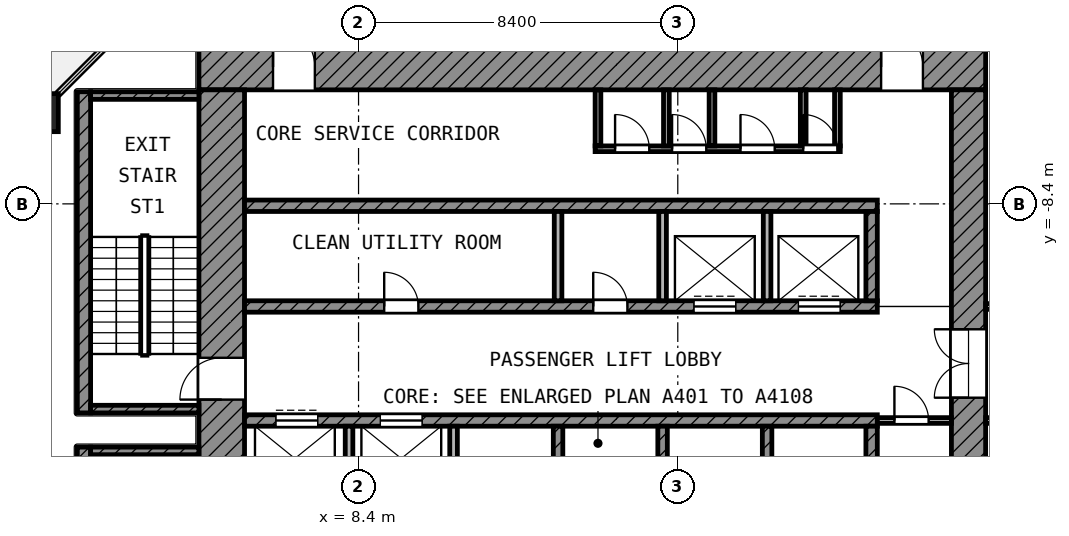
"""IFC4 building model, lengths in metres.
Left out: names, types, materials, properties, quantities, classifications, styles, units other than length and angle.
Written with IfcOpenShell. Run it as: python <this file> out.ifc"""

import sys

from ifc_helpers import new_model, si_unit, direction, frame, frame_2d, origin, origin_2d, place, context, subcontext, project, spatial, rectangle, extrude, element, fill, save


model = new_model("IFC4")
c1 = context("Model", 3, precision=1e-05, world=origin(), true_north=direction((0.0, 1.0)))
c2 = subcontext(c1, "Body", "Model", "MODEL_VIEW")
j1 = project(units=[si_unit("LENGTHUNIT", "METRE"), si_unit("PLANEANGLEUNIT", "RADIAN")], contexts=[c1])
p1 = place(None, origin())
s1 = spatial("IfcSite", under=j1, at=p1, CompositionType="ELEMENT")
p2 = place(p1, origin())
s2 = spatial("IfcBuilding", under=s1, at=p2, CompositionType="ELEMENT")
p3 = place(p2, frame((0.0, 0.0, 171.0)))
s3 = spatial("IfcBuildingStorey", under=s2, at=p3, CompositionType="ELEMENT", Elevation=171.0)
p4 = place(p3, frame((0.0, -6.0, 0.0), z_axis=(0.0, 0.0, 1.0), x_axis=(1.0, 0.0, 0.0)))
e1 = element("IfcColumn", 1, at=p4, inside=s3, PredefinedType="COLUMN", context=c2, shape_type="SweptSolid", body=[
    extrude(rectangle(XDim=1.0, YDim=1.0, at=origin_2d()), origin(), (0.0, 0.0, 1.0), 4.2),
])
p5 = place(p3, frame((4.2, -4.8, 0.0), z_axis=(0.0, 0.0, 1.0), x_axis=(1.0, 0.0, 0.0)))
e2 = element("IfcWall", 2, at=p5, inside=s3, PredefinedType="SHEAR", context=c2, shape_type="SweptSolid", body=[
    extrude(rectangle(XDim=20.7, YDim=1.2, at=frame_2d((10.35, 0.0))), origin(), (0.0, 0.0, 1.0), 3.6),
])
p6 = place(p5, frame((1.95, 0.0, 0.0)))
e3 = element("IfcOpeningElement", 3, at=p6, cuts=e2, PredefinedType="OPENING", context=c2, shape_type="SweptSolid", body=[
    extrude(rectangle(XDim=1.1, YDim=2.1, at=frame_2d((0.55, 1.05))), frame((0.0, 0.61, 0.0), z_axis=(0.0, -1.0, 0.0), x_axis=(1.0, 0.0, 0.0)), (0.0, 0.0, 1.0), 1.22),
])
p7 = place(p5, frame((17.95, 0.0, 0.0)))
e4 = element("IfcOpeningElement", 4, at=p7, cuts=e2, PredefinedType="OPENING", context=c2, shape_type="SweptSolid", body=[
    extrude(rectangle(XDim=1.1, YDim=2.1, at=frame_2d((0.55, 1.05))), frame((0.0, 0.61, 0.0), z_axis=(0.0, -1.0, 0.0), x_axis=(1.0, 0.0, 0.0)), (0.0, 0.0, 1.0), 1.22),
])
p8 = place(p3, frame((4.8, -24.9, 0.0), z_axis=(0.0, 0.0, 1.0), x_axis=(0.0, 1.0, 0.0)))
e5 = element("IfcWall", 5, at=p8, inside=s3, PredefinedType="SHEAR", context=c2, shape_type="SweptSolid", body=[
    extrude(rectangle(XDim=19.5, YDim=1.2, at=frame_2d((9.75, 0.0))), origin(), (0.0, 0.0, 1.0), 3.6),
])
p9 = place(p8, frame((11.35, 0.0, 0.0)))
e6 = element("IfcOpeningElement", 6, at=p9, cuts=e5, PredefinedType="OPENING", context=c2, shape_type="SweptSolid", body=[
    extrude(rectangle(XDim=1.1, YDim=2.1, at=frame_2d((0.55, 1.05))), frame((0.0, 0.61, 0.0), z_axis=(0.0, -1.0, 0.0), x_axis=(1.0, 0.0, 0.0)), (0.0, 0.0, 1.0), 1.22),
])
p10 = place(p8, frame((2.05, 0.0, 0.0)))
e7 = element("IfcOpeningElement", 7, at=p10, cuts=e5, PredefinedType="OPENING", context=c2, shape_type="SweptSolid", body=[
    extrude(rectangle(XDim=1.1, YDim=2.1, at=frame_2d((0.55, 1.05))), frame((0.0, 0.61, 0.0), z_axis=(0.0, -1.0, 0.0), x_axis=(1.0, 0.0, 0.0)), (0.0, 0.0, 1.0), 1.22),
])
p11 = place(p3, frame((24.45, -24.0, 0.0), z_axis=(0.0, 0.0, 1.0), x_axis=(0.0, 1.0, 0.0)))
e8 = element("IfcWall", 8, at=p11, inside=s3, PredefinedType="SHEAR", context=c2, shape_type="SweptSolid", body=[
    extrude(rectangle(XDim=18.6, YDim=0.9, at=frame_2d((9.3, 0.0))), origin(), (0.0, 0.0, 1.0), 3.6),
])
p12 = place(p11, frame((10.5, 0.0, 0.0)))
e9 = element("IfcOpeningElement", 9, at=p12, cuts=e8, PredefinedType="OPENING", context=c2, shape_type="SweptSolid", body=[
    extrude(rectangle(XDim=1.8, YDim=2.1, at=frame_2d((0.9, 1.05))), frame((0.0, 0.46, 0.0), z_axis=(0.0, -1.0, 0.0), x_axis=(1.0, 0.0, 0.0)), (0.0, 0.0, 1.0), 0.92),
])
p13 = place(p3, frame((5.4, -8.45, 0.0), z_axis=(0.0, 0.0, 1.0), x_axis=(1.0, 0.0, 0.0)))
e10 = element("IfcWall", 10, at=p13, inside=s3, PredefinedType="SHEAR", context=c2, shape_type="SweptSolid", body=[
    extrude(rectangle(XDim=16.65, YDim=0.3, at=frame_2d((8.325, 0.0))), origin(), (0.0, 0.0, 1.0), 3.6),
])
p14 = place(p3, frame((5.4, -11.1, 0.0), z_axis=(0.0, 0.0, 1.0), x_axis=(1.0, 0.0, 0.0)))
e11 = element("IfcWall", 11, at=p14, inside=s3, PredefinedType="SHEAR", context=c2, shape_type="SweptSolid", body=[
    extrude(rectangle(XDim=16.65, YDim=0.3, at=frame_2d((8.325, 0.0))), origin(), (0.0, 0.0, 1.0), 3.6),
])
p15 = place(p14, frame((11.825, 0.0, 0.0)))
e12 = element("IfcOpeningElement", 12, at=p15, cuts=e11, PredefinedType="OPENING", context=c2, shape_type="SweptSolid", body=[
    extrude(rectangle(XDim=1.1, YDim=2.1, at=frame_2d((0.55, 1.05))), frame((0.0, 0.16, 0.0), z_axis=(0.0, -1.0, 0.0), x_axis=(1.0, 0.0, 0.0)), (0.0, 0.0, 1.0), 0.32),
])
p16 = place(p14, frame((14.575, 0.0, 0.0)))
e13 = element("IfcOpeningElement", 13, at=p16, cuts=e11, PredefinedType="OPENING", context=c2, shape_type="SweptSolid", body=[
    extrude(rectangle(XDim=1.1, YDim=2.1, at=frame_2d((0.55, 1.05))), frame((0.0, 0.16, 0.0), z_axis=(0.0, -1.0, 0.0), x_axis=(1.0, 0.0, 0.0)), (0.0, 0.0, 1.0), 0.32),
])
p17 = place(p14, frame((3.675, 0.0, 0.0)))
e14 = element("IfcOpeningElement", 14, at=p17, cuts=e11, PredefinedType="OPENING", context=c2, shape_type="SweptSolid", body=[
    extrude(rectangle(XDim=0.9, YDim=2.1, at=frame_2d((0.45, 1.05))), frame((0.0, 0.16, 0.0), z_axis=(0.0, -1.0, 0.0), x_axis=(1.0, 0.0, 0.0)), (0.0, 0.0, 1.0), 0.32),
])
p18 = place(p14, frame((9.175, 0.0, 0.0)))
e15 = element("IfcOpeningElement", 15, at=p18, cuts=e11, PredefinedType="OPENING", context=c2, shape_type="SweptSolid", body=[
    extrude(rectangle(XDim=0.9, YDim=2.1, at=frame_2d((0.45, 1.05))), frame((0.0, 0.16, 0.0), z_axis=(0.0, -1.0, 0.0), x_axis=(1.0, 0.0, 0.0)), (0.0, 0.0, 1.0), 0.32),
])
p19 = place(p3, frame((5.4, -14.1, 0.0), z_axis=(0.0, 0.0, 1.0), x_axis=(1.0, 0.0, 0.0)))
e16 = element("IfcWall", 16, at=p19, inside=s3, PredefinedType="SHEAR", context=c2, shape_type="SweptSolid", body=[
    extrude(rectangle(XDim=16.65, YDim=0.3, at=frame_2d((8.325, 0.0))), origin(), (0.0, 0.0, 1.0), 3.6),
])
p20 = place(p19, frame((0.825, 0.0, 0.0)))
e17 = element("IfcOpeningElement", 17, at=p20, cuts=e16, PredefinedType="OPENING", context=c2, shape_type="SweptSolid", body=[
    extrude(rectangle(XDim=1.1, YDim=2.1, at=frame_2d((0.55, 1.05))), frame((0.0, 0.16, 0.0), z_axis=(0.0, -1.0, 0.0), x_axis=(1.0, 0.0, 0.0)), (0.0, 0.0, 1.0), 0.32),
])
p21 = place(p19, frame((3.575, 0.0, 0.0)))
e18 = element("IfcOpeningElement", 18, at=p21, cuts=e16, PredefinedType="OPENING", context=c2, shape_type="SweptSolid", body=[
    extrude(rectangle(XDim=1.1, YDim=2.1, at=frame_2d((0.55, 1.05))), frame((0.0, 0.16, 0.0), z_axis=(0.0, -1.0, 0.0), x_axis=(1.0, 0.0, 0.0)), (0.0, 0.0, 1.0), 0.32),
])
p22 = place(p3, frame((21.9, -10.95, 0.0), z_axis=(0.0, 0.0, 1.0), x_axis=(0.0, 1.0, 0.0)))
e19 = element("IfcWall", 19, at=p22, inside=s3, PredefinedType="SHEAR", context=c2, shape_type="SweptSolid", body=[
    extrude(rectangle(XDim=2.35, YDim=0.3, at=frame_2d((1.175, 0.0))), origin(), (0.0, 0.0, 1.0), 3.6),
])
p23 = place(p3, frame((21.9, -16.6, 0.0), z_axis=(0.0, 0.0, 1.0), x_axis=(0.0, 1.0, 0.0)))
e20 = element("IfcWall", 20, at=p23, inside=s3, PredefinedType="SHEAR", context=c2, shape_type="SweptSolid", body=[
    extrude(rectangle(XDim=2.35, YDim=0.3, at=frame_2d((1.175, 0.0))), origin(), (0.0, 0.0, 1.0), 3.6),
])
for number, where, z_axis, x_axis in (
    (21, (13.65, -10.95, 0.0), (0.0, 0.0, 1.0), (0.0, 1.0, 0.0)),
    (22, (16.4, -10.95, 0.0), (0.0, 0.0, 1.0), (0.0, 1.0, 0.0)),
    (23, (19.15, -10.95, 0.0), (0.0, 0.0, 1.0), (0.0, 1.0, 0.0)),
):
    element("IfcWall", number, at=place(p3, frame(where, z_axis=z_axis, x_axis=x_axis)), inside=s3, PredefinedType="PARTITIONING", context=c2, shape_type="SweptSolid", body=[
        extrude(rectangle(XDim=2.35, YDim=0.2, at=frame_2d((1.175, 0.0))), origin(), (0.0, 0.0, 1.0), 3.6),
    ])
for number, where, z_axis, x_axis in (
    (24, (8.15, -16.6, 0.0), (0.0, 0.0, 1.0), (0.0, 1.0, 0.0)),
    (25, (10.9, -16.6, 0.0), (0.0, 0.0, 1.0), (0.0, 1.0, 0.0)),
):
    element("IfcWall", number, at=place(p3, frame(where, z_axis=z_axis, x_axis=x_axis)), inside=s3, PredefinedType="PARTITIONING", context=c2, shape_type="SweptSolid", body=[
        extrude(rectangle(XDim=2.35, YDim=0.2, at=frame_2d((1.175, 0.0))), origin(), (0.0, 0.0, 1.0), 3.6),
    ])
for number, where, z_axis, x_axis in (
    (26, (13.65, -16.6, 0.0), (0.0, 0.0, 1.0), (0.0, 1.0, 0.0)),
    (27, (16.4, -16.6, 0.0), (0.0, 0.0, 1.0), (0.0, 1.0, 0.0)),
    (28, (19.15, -16.6, 0.0), (0.0, 0.0, 1.0), (0.0, 1.0, 0.0)),
):
    element("IfcWall", number, at=place(p3, frame(where, z_axis=z_axis, x_axis=x_axis)), inside=s3, PredefinedType="SHEAR", context=c2, shape_type="SweptSolid", body=[
        extrude(rectangle(XDim=2.35, YDim=0.25, at=frame_2d((1.175, 0.0))), origin(), (0.0, 0.0, 1.0), 3.6),
    ])
p24 = place(p3, frame((22.05, -14.1, 0.0), z_axis=(0.0, 0.0, 1.0), x_axis=(1.0, 0.0, 0.0)))
e29 = element("IfcWall", 29, at=p24, inside=s3, PredefinedType="PARTITIONING", context=c2, shape_type="SweptSolid", body=[
    extrude(rectangle(XDim=1.95, YDim=0.15, at=frame_2d((0.975, 0.0))), origin(), (0.0, 0.0, 1.0), 3.6),
])
p25 = place(p24, frame((0.45, 0.0, 0.0)))
e30 = element("IfcOpeningElement", 30, at=p25, cuts=e29, PredefinedType="OPENING", context=c2, shape_type="SweptSolid", body=[
    extrude(rectangle(XDim=0.9, YDim=2.1, at=frame_2d((0.45, 1.05))), frame((0.0, 0.085, 0.0), z_axis=(0.0, -1.0, 0.0), x_axis=(1.0, 0.0, 0.0)), (0.0, 0.0, 1.0), 0.17),
])
p26 = place(p3, frame((14.625, -6.95, 0.0), z_axis=(0.0, 0.0, 1.0), x_axis=(1.0, 0.0, 0.0)))
e31 = element("IfcWall", 31, at=p26, inside=s3, PredefinedType="PARTITIONING", context=c2, shape_type="SweptSolid", body=[
    extrude(rectangle(XDim=6.45, YDim=0.15, at=frame_2d((3.225, 0.0))), origin(), (0.0, 0.0, 1.0), 3.6),
])
p27 = place(p26, frame((0.525, 0.0, 0.0)))
e32 = element("IfcOpeningElement", 32, at=p27, cuts=e31, PredefinedType="OPENING", context=c2, shape_type="SweptSolid", body=[
    extrude(rectangle(XDim=0.9, YDim=2.1, at=frame_2d((0.45, 1.05))), frame((0.0, 0.085, 0.0), z_axis=(0.0, -1.0, 0.0), x_axis=(1.0, 0.0, 0.0)), (0.0, 0.0, 1.0), 0.17),
])
p28 = place(p26, frame((2.025, 0.0, 0.0)))
e33 = element("IfcOpeningElement", 33, at=p28, cuts=e31, PredefinedType="OPENING", context=c2, shape_type="SweptSolid", body=[
    extrude(rectangle(XDim=0.9, YDim=2.1, at=frame_2d((0.45, 1.05))), frame((0.0, 0.085, 0.0), z_axis=(0.0, -1.0, 0.0), x_axis=(1.0, 0.0, 0.0)), (0.0, 0.0, 1.0), 0.17),
])
p29 = place(p26, frame((3.825, 0.0, 0.0)))
e34 = element("IfcOpeningElement", 34, at=p29, cuts=e31, PredefinedType="OPENING", context=c2, shape_type="SweptSolid", body=[
    extrude(rectangle(XDim=0.9, YDim=2.1, at=frame_2d((0.45, 1.05))), frame((0.0, 0.085, 0.0), z_axis=(0.0, -1.0, 0.0), x_axis=(1.0, 0.0, 0.0)), (0.0, 0.0, 1.0), 0.17),
])
p30 = place(p26, frame((5.475, 0.0, 0.0)))
e35 = element("IfcOpeningElement", 35, at=p30, cuts=e31, PredefinedType="OPENING", context=c2, shape_type="SweptSolid", body=[
    extrude(rectangle(XDim=0.9, YDim=2.1, at=frame_2d((0.45, 1.05))), frame((0.0, 0.085, 0.0), z_axis=(0.0, -1.0, 0.0), x_axis=(1.0, 0.0, 0.0)), (0.0, 0.0, 1.0), 0.17),
])
for number, where, z_axis, x_axis in (
    (36, (14.7, -6.875, 0.0), (0.0, 0.0, 1.0), (0.0, 1.0, 0.0)),
    (37, (16.5, -6.875, 0.0), (0.0, 0.0, 1.0), (0.0, 1.0, 0.0)),
    (38, (17.7, -6.875, 0.0), (0.0, 0.0, 1.0), (0.0, 1.0, 0.0)),
    (39, (20.1, -6.875, 0.0), (0.0, 0.0, 1.0), (0.0, 1.0, 0.0)),
    (40, (21.0, -6.875, 0.0), (0.0, 0.0, 1.0), (0.0, 1.0, 0.0)),
):
    element("IfcWall", number, at=place(p3, frame(where, z_axis=z_axis, x_axis=x_axis)), inside=s3, PredefinedType="PARTITIONING", context=c2, shape_type="SweptSolid", body=[
        extrude(rectangle(XDim=1.475, YDim=0.15, at=frame_2d((0.738, 0.0))), origin(), (0.0, 0.0, 1.0), 3.6),
    ])
p31 = place(p3, frame((1.175, -13.9, 0.0), z_axis=(0.0, 0.0, 1.0), x_axis=(0.0, 1.0, 0.0)))
e41 = element("IfcWall", 41, at=p31, inside=s3, PredefinedType="SHEAR", context=c2, shape_type="SweptSolid", body=[
    extrude(rectangle(XDim=8.45, YDim=0.35, at=frame_2d((4.225, 0.0))), origin(), (0.0, 0.0, 1.0), 3.6),
])
for number, where, z_axis, x_axis in (
    (42, (1.35, -5.55, 0.0), (0.0, 0.0, 1.0), (1.0, 0.0, 0.0)),
    (43, (1.35, -13.8, 0.0), (0.0, 0.0, 1.0), (1.0, 0.0, 0.0)),
):
    element("IfcWall", number, at=place(p3, frame(where, z_axis=z_axis, x_axis=x_axis)), inside=s3, PredefinedType="SHEAR", context=c2, shape_type="SweptSolid", body=[
        extrude(rectangle(XDim=2.85, YDim=0.2, at=frame_2d((1.425, 0.0))), origin(), (0.0, 0.0, 1.0), 3.6),
    ])
p32 = place(p3, frame((1.175, -23.25, 0.0), z_axis=(0.0, 0.0, 1.0), x_axis=(0.0, 1.0, 0.0)))
e44 = element("IfcWall", 44, at=p32, inside=s3, PredefinedType="SHEAR", context=c2, shape_type="SweptSolid", body=[
    extrude(rectangle(XDim=8.45, YDim=0.35, at=frame_2d((4.225, 0.0))), origin(), (0.0, 0.0, 1.0), 3.6),
])
p33 = place(p3, frame((1.35, -14.9, 0.0), z_axis=(0.0, 0.0, 1.0), x_axis=(1.0, 0.0, 0.0)))
e45 = element("IfcWall", 45, at=p33, inside=s3, PredefinedType="SHEAR", context=c2, shape_type="SweptSolid", body=[
    extrude(rectangle(XDim=2.85, YDim=0.2, at=frame_2d((1.425, 0.0))), origin(), (0.0, 0.0, 1.0), 3.6),
])
p34 = place(p3, frame((24.9, -14.1, 0.0), z_axis=(0.0, 0.0, 1.0), x_axis=(1.0, 0.0, 0.0)))
e46 = element("IfcWall", 46, at=p34, inside=s3, PredefinedType="PARTITIONING", context=c2, shape_type="SweptSolid", body=[
    extrude(rectangle(XDim=4.425, YDim=0.15, at=frame_2d((2.212, 0.0))), origin(), (0.0, 0.0, 1.0), 3.6),
])
p35 = place(p34, frame((1.65, 0.0, 0.0)))
e47 = element("IfcOpeningElement", 47, at=p35, cuts=e46, PredefinedType="OPENING", context=c2, shape_type="SweptSolid", body=[
    extrude(rectangle(XDim=1.5, YDim=2.1, at=frame_2d((0.75, 1.05))), frame((0.0, 0.085, 0.0), z_axis=(0.0, -1.0, 0.0), x_axis=(1.0, 0.0, 0.0)), (0.0, 0.0, 1.0), 0.17),
])
p36 = place(p3, frame((24.9, -11.1, 0.0), z_axis=(0.0, 0.0, 1.0), x_axis=(1.0, 0.0, 0.0)))
e48 = element("IfcWall", 48, at=p36, inside=s3, PredefinedType="PARTITIONING", context=c2, shape_type="SweptSolid", body=[
    extrude(rectangle(XDim=4.425, YDim=0.15, at=frame_2d((2.212, 0.0))), origin(), (0.0, 0.0, 1.0), 3.6),
])
p37 = place(p36, frame((0.9, 0.0, 0.0)))
e49 = element("IfcOpeningElement", 49, at=p37, cuts=e48, PredefinedType="OPENING", context=c2, shape_type="SweptSolid", body=[
    extrude(rectangle(XDim=0.9, YDim=2.1, at=frame_2d((0.45, 1.05))), frame((0.0, 0.085, 0.0), z_axis=(0.0, -1.0, 0.0), x_axis=(1.0, 0.0, 0.0)), (0.0, 0.0, 1.0), 0.17),
])
p38 = place(p36, frame((2.95, 0.0, 0.0)))
e50 = element("IfcOpeningElement", 50, at=p38, cuts=e48, PredefinedType="OPENING", context=c2, shape_type="SweptSolid", body=[
    extrude(rectangle(XDim=1.0, YDim=2.1, at=frame_2d((0.5, 1.05))), frame((0.0, 0.085, 0.0), z_axis=(0.0, -1.0, 0.0), x_axis=(1.0, 0.0, 0.0)), (0.0, 0.0, 1.0), 0.17),
])
p39 = place(p15, origin())
e51 = element("IfcDoor", 51, at=p39, inside=s3, OperationType="DOUBLE_DOOR_SLIDING", PredefinedType="DOOR", context=c2, shape_type="SweptSolid", body=[
    extrude(rectangle(XDim=1.1, YDim=2.1, at=frame_2d((0.55, 1.05))), frame((0.0, 0.025, 0.0), z_axis=(0.0, -1.0, 0.0), x_axis=(1.0, 0.0, 0.0)), (0.0, 0.0, 1.0), 0.05),
])
fill(e12, e51)
p40 = place(p16, origin())
e52 = element("IfcDoor", 52, at=p40, inside=s3, OperationType="DOUBLE_DOOR_SLIDING", PredefinedType="DOOR", context=c2, shape_type="SweptSolid", body=[
    extrude(rectangle(XDim=1.1, YDim=2.1, at=frame_2d((0.55, 1.05))), frame((0.0, 0.025, 0.0), z_axis=(0.0, -1.0, 0.0), x_axis=(1.0, 0.0, 0.0)), (0.0, 0.0, 1.0), 0.05),
])
fill(e13, e52)
p41 = place(p20, origin())
e53 = element("IfcDoor", 53, at=p41, inside=s3, OperationType="DOUBLE_DOOR_SLIDING", PredefinedType="DOOR", context=c2, shape_type="SweptSolid", body=[
    extrude(rectangle(XDim=1.1, YDim=2.1, at=frame_2d((0.55, 1.05))), frame((0.0, 0.025, 0.0), z_axis=(0.0, -1.0, 0.0), x_axis=(1.0, 0.0, 0.0)), (0.0, 0.0, 1.0), 0.05),
])
fill(e17, e53)
p42 = place(p21, origin())
e54 = element("IfcDoor", 54, at=p42, inside=s3, OperationType="DOUBLE_DOOR_SLIDING", PredefinedType="DOOR", context=c2, shape_type="SweptSolid", body=[
    extrude(rectangle(XDim=1.1, YDim=2.1, at=frame_2d((0.55, 1.05))), frame((0.0, 0.025, 0.0), z_axis=(0.0, -1.0, 0.0), x_axis=(1.0, 0.0, 0.0)), (0.0, 0.0, 1.0), 0.05),
])
fill(e18, e54)
p43 = place(p9, origin())
e55 = element("IfcDoor", 55, at=p43, inside=s3, OperationType="SINGLE_SWING_LEFT", PredefinedType="DOOR", context=c2, shape_type="SweptSolid", body=[
    extrude(rectangle(XDim=1.1, YDim=2.1, at=frame_2d((0.55, 1.05))), frame((0.0, 0.025, 0.0), z_axis=(0.0, -1.0, 0.0), x_axis=(1.0, 0.0, 0.0)), (0.0, 0.0, 1.0), 0.05),
])
fill(e6, e55)
p44 = place(p6, origin())
e56 = element("IfcDoor", 56, at=p44, inside=s3, OperationType="SINGLE_SWING_LEFT", PredefinedType="DOOR", context=c2, shape_type="SweptSolid", body=[
    extrude(rectangle(XDim=1.1, YDim=2.1, at=frame_2d((0.55, 1.05))), frame((0.0, 0.025, 0.0), z_axis=(0.0, -1.0, 0.0), x_axis=(1.0, 0.0, 0.0)), (0.0, 0.0, 1.0), 0.05),
])
fill(e3, e56)
p45 = place(p7, origin())
e57 = element("IfcDoor", 57, at=p45, inside=s3, OperationType="SINGLE_SWING_LEFT", PredefinedType="DOOR", context=c2, shape_type="SweptSolid", body=[
    extrude(rectangle(XDim=1.1, YDim=2.1, at=frame_2d((0.55, 1.05))), frame((0.0, 0.025, 0.0), z_axis=(0.0, -1.0, 0.0), x_axis=(1.0, 0.0, 0.0)), (0.0, 0.0, 1.0), 0.05),
])
fill(e4, e57)
p46 = place(p12, origin())
e58 = element("IfcDoor", 58, at=p46, inside=s3, OperationType="DOUBLE_DOOR_SINGLE_SWING", PredefinedType="DOOR", context=c2, shape_type="SweptSolid", body=[
    extrude(rectangle(XDim=1.8, YDim=2.1, at=frame_2d((0.9, 1.05))), frame((0.0, 0.025, 0.0), z_axis=(0.0, -1.0, 0.0), x_axis=(1.0, 0.0, 0.0)), (0.0, 0.0, 1.0), 0.05),
])
fill(e9, e58)
p47 = place(p27, origin())
e59 = element("IfcDoor", 59, at=p47, inside=s3, OperationType="SINGLE_SWING_LEFT", PredefinedType="DOOR", context=c2, shape_type="SweptSolid", body=[
    extrude(rectangle(XDim=0.9, YDim=2.1, at=frame_2d((0.45, 1.05))), frame((0.0, 0.025, 0.0), z_axis=(0.0, -1.0, 0.0), x_axis=(1.0, 0.0, 0.0)), (0.0, 0.0, 1.0), 0.05),
])
fill(e32, e59)
p48 = place(p28, origin())
e60 = element("IfcDoor", 60, at=p48, inside=s3, OperationType="SINGLE_SWING_LEFT", PredefinedType="DOOR", context=c2, shape_type="SweptSolid", body=[
    extrude(rectangle(XDim=0.9, YDim=2.1, at=frame_2d((0.45, 1.05))), frame((0.0, 0.025, 0.0), z_axis=(0.0, -1.0, 0.0), x_axis=(1.0, 0.0, 0.0)), (0.0, 0.0, 1.0), 0.05),
])
fill(e33, e60)
p49 = place(p29, origin())
e61 = element("IfcDoor", 61, at=p49, inside=s3, OperationType="SINGLE_SWING_LEFT", PredefinedType="DOOR", context=c2, shape_type="SweptSolid", body=[
    extrude(rectangle(XDim=0.9, YDim=2.1, at=frame_2d((0.45, 1.05))), frame((0.0, 0.025, 0.0), z_axis=(0.0, -1.0, 0.0), x_axis=(1.0, 0.0, 0.0)), (0.0, 0.0, 1.0), 0.05),
])
fill(e34, e61)
p50 = place(p30, origin())
e62 = element("IfcDoor", 62, at=p50, inside=s3, OperationType="SINGLE_SWING_LEFT", PredefinedType="DOOR", context=c2, shape_type="SweptSolid", body=[
    extrude(rectangle(XDim=0.9, YDim=2.1, at=frame_2d((0.45, 1.05))), frame((0.0, 0.025, 0.0), z_axis=(0.0, -1.0, 0.0), x_axis=(1.0, 0.0, 0.0)), (0.0, 0.0, 1.0), 0.05),
])
fill(e35, e62)
p51 = place(p25, origin())
e63 = element("IfcDoor", 63, at=p51, inside=s3, OperationType="SINGLE_SWING_LEFT", PredefinedType="DOOR", context=c2, shape_type="SweptSolid", body=[
    extrude(rectangle(XDim=0.9, YDim=2.1, at=frame_2d((0.45, 1.05))), frame((0.0, 0.025, 0.0), z_axis=(0.0, -1.0, 0.0), x_axis=(1.0, 0.0, 0.0)), (0.0, 0.0, 1.0), 0.05),
])
fill(e30, e63)
p52 = place(p17, origin())
e64 = element("IfcDoor", 64, at=p52, inside=s3, OperationType="SINGLE_SWING_LEFT", PredefinedType="DOOR", context=c2, shape_type="SweptSolid", body=[
    extrude(rectangle(XDim=0.9, YDim=2.1, at=frame_2d((0.45, 1.05))), frame((0.0, 0.025, 0.0), z_axis=(0.0, -1.0, 0.0), x_axis=(1.0, 0.0, 0.0)), (0.0, 0.0, 1.0), 0.05),
])
fill(e14, e64)
p53 = place(p18, origin())
e65 = element("IfcDoor", 65, at=p53, inside=s3, OperationType="SINGLE_SWING_LEFT", PredefinedType="DOOR", context=c2, shape_type="SweptSolid", body=[
    extrude(rectangle(XDim=0.9, YDim=2.1, at=frame_2d((0.45, 1.05))), frame((0.0, 0.025, 0.0), z_axis=(0.0, -1.0, 0.0), x_axis=(1.0, 0.0, 0.0)), (0.0, 0.0, 1.0), 0.05),
])
fill(e15, e65)
save(model, sys.argv[1])
